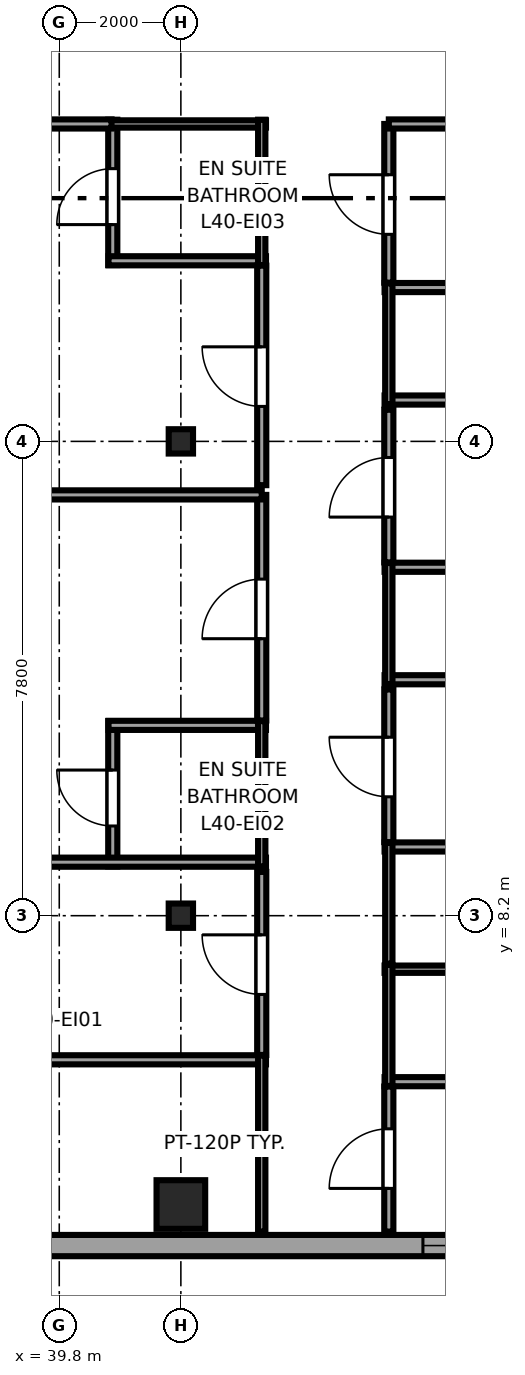
"""IFC4 building model, lengths in metres.
Left out: names, types, materials, properties, quantities, classifications, styles, units other than length and angle.
Written with IfcOpenShell. Run it as: python <this file> out.ifc"""

import sys

from ifc_helpers import new_model, si_unit, direction, frame, frame_2d, origin, origin_2d, place, context, subcontext, project, spatial, rectangle, i_section, extrude, source, transform, mapped, element, fill, save


model = new_model("IFC4")
c1 = context("Model", 3, precision=1e-05, world=origin(), true_north=direction((0.0, 1.0)))
c2 = subcontext(c1, "Body", "Model", "MODEL_VIEW")
j1 = project(units=[si_unit("LENGTHUNIT", "METRE"), si_unit("PLANEANGLEUNIT", "RADIAN")], contexts=[c1])
p1 = place(None, origin())
s1 = spatial("IfcSite", under=j1, at=p1, CompositionType="ELEMENT")
p2 = place(p1, origin())
s2 = spatial("IfcBuilding", under=s1, at=p2, CompositionType="ELEMENT")
p3 = place(p2, frame((0.0, 0.0, 154.15)))
s3 = spatial("IfcBuildingStorey", under=s2, at=p3, CompositionType="ELEMENT", Elevation=154.15)
m1 = source(origin(), c2, "Body", "SweptSolid", [
    extrude(rectangle(XDim=0.8, YDim=0.8, at=origin_2d()), origin(), (0.0, 0.0, 1.0), 3.55),
])
p4 = place(p3, frame((41.8, 3.45, 0.0), z_axis=(0.0, 0.0, 1.0), x_axis=(1.0, 0.0, 0.0)))
e1 = element("IfcColumn", 1, at=p4, inside=s3, PredefinedType="COLUMN", context=c2, shape_type="MappedRepresentation", body=[
    mapped(m1, transform((0.0, 0.0, 0.0), x_axis=(1.0, 0.0, 0.0), y_axis=(0.0, 1.0, 0.0), z_axis=(0.0, 0.0, 1.0), scale=1.0)),
])
m2 = source(origin(), c2, "Body", "SweptSolid", [
    extrude(i_section(OverallWidth=0.4, OverallDepth=0.4, WebThickness=0.02, FlangeThickness=0.035, at=origin_2d()), origin(), (0.0, 0.0, 1.0), 3.55),
])
for number, where, z_axis, x_axis in (
    (2, (41.8, 8.2, 0.0), (0.0, 0.0, 1.0), (1.0, 0.0, 0.0)),
    (3, (41.8, 16.0, 0.0), (0.0, 0.0, 1.0), (1.0, 0.0, 0.0)),
):
    element("IfcColumn", number, at=place(p3, frame(where, z_axis=z_axis, x_axis=x_axis)), inside=s3, PredefinedType="COLUMN", context=c2, shape_type="MappedRepresentation", body=[
        mapped(m2, transform((0.0, 0.0, 0.0), x_axis=(1.0, 0.0, 0.0), y_axis=(0.0, 1.0, 0.0), z_axis=(0.0, 0.0, 1.0), scale=1.0)),
    ])
p5 = place(p3, frame((34.375, 2.775, 0.0), z_axis=(0.0, 0.0, 1.0), x_axis=(1.0, 0.0, 0.0)))
e4 = element("IfcWall", 4, at=p5, inside=s3, PredefinedType="SOLIDWALL", context=c2, shape_type="SweptSolid", body=[
    extrude(rectangle(XDim=15.608, YDim=0.35, at=frame_2d((7.804, 0.0))), origin(), (0.0, 0.0, 1.0), 3.37),
])
p6 = place(p5, frame((1.801, 0.0, 0.68)))
e5 = element("IfcOpeningElement", 5, at=p6, cuts=e4, PredefinedType="OPENING", context=c2, shape_type="SweptSolid", body=[
    extrude(rectangle(XDim=2.4, YDim=1.9, at=frame_2d((1.2, 0.95))), frame((0.0, 0.185, 0.0), z_axis=(0.0, -1.0, 0.0), x_axis=(1.0, 0.0, 0.0)), (0.0, 0.0, 1.0), 0.37),
])
p7 = place(p5, frame((11.406, 0.0, 0.68)))
e6 = element("IfcOpeningElement", 6, at=p7, cuts=e4, PredefinedType="OPENING", context=c2, shape_type="SweptSolid", body=[
    extrude(rectangle(XDim=2.4, YDim=1.9, at=frame_2d((1.2, 0.95))), frame((0.0, 0.185, 0.0), z_axis=(0.0, -1.0, 0.0), x_axis=(1.0, 0.0, 0.0)), (0.0, 0.0, 1.0), 0.37),
])
p8 = place(p3, frame((39.46, 5.83, 0.0), z_axis=(0.0, 0.0, 1.0), x_axis=(1.0, 0.0, 0.0)))
e7 = element("IfcWall", 7, at=p8, inside=s3, PredefinedType="PARTITIONING", context=c2, shape_type="SweptSolid", body=[
    extrude(rectangle(XDim=3.74, YDim=0.15, at=frame_2d((1.87, 0.0))), origin(), (0.0, 0.0, 1.0), 3.37),
])
p9 = place(p3, frame((43.13, 3.005, 0.0), z_axis=(0.0, 0.0, 1.0), x_axis=(0.0, 1.0, 0.0)))
e8 = element("IfcWall", 8, at=p9, inside=s3, PredefinedType="PLUMBINGWALL", context=c2, shape_type="SweptSolid", body=[
    extrude(rectangle(XDim=2.895, YDim=0.12, at=frame_2d((1.448, 0.0))), origin(), (0.0, 0.0, 1.0), 3.37),
])
p10 = place(p3, frame((40.68, 9.01, 0.0), z_axis=(0.0, 0.0, 1.0), x_axis=(0.0, 1.0, 0.0)))
e9 = element("IfcWall", 9, at=p10, inside=s3, PredefinedType="PARTITIONING", context=c2, shape_type="SweptSolid", body=[
    extrude(rectangle(XDim=2.39, YDim=0.15, at=frame_2d((1.195, 0.0))), origin(), (0.0, 0.0, 1.0), 3.37),
])
p11 = place(p10, frame((0.665, 0.0, 0.0)))
e10 = element("IfcOpeningElement", 10, at=p11, cuts=e9, PredefinedType="OPENING", context=c2, shape_type="SweptSolid", body=[
    extrude(rectangle(XDim=0.92, YDim=2.01, at=frame_2d((0.46, 1.005))), frame((0.0, 0.085, 0.0), z_axis=(0.0, -1.0, 0.0), x_axis=(1.0, 0.0, 0.0)), (0.0, 0.0, 1.0), 0.17),
])
p12 = place(p3, frame((34.65, 9.08, 0.0), z_axis=(0.0, 0.0, 1.0), x_axis=(1.0, 0.0, 0.0)))
e11 = element("IfcWall", 11, at=p12, inside=s3, PredefinedType="PARTITIONING", context=c2, shape_type="SweptSolid", body=[
    extrude(rectangle(XDim=8.55, YDim=0.15, at=frame_2d((4.275, 0.0))), origin(), (0.0, 0.0, 1.0), 3.37),
])
p13 = place(p3, frame((40.61, 11.33, 0.0), z_axis=(0.0, 0.0, 1.0), x_axis=(1.0, 0.0, 0.0)))
e12 = element("IfcWall", 12, at=p13, inside=s3, PredefinedType="PARTITIONING", context=c2, shape_type="SweptSolid", body=[
    extrude(rectangle(XDim=2.59, YDim=0.15, at=frame_2d((1.295, 0.0))), origin(), (0.0, 0.0, 1.0), 3.37),
])
p14 = place(p3, frame((43.13, 9.01, 0.0), z_axis=(0.0, 0.0, 1.0), x_axis=(0.0, 1.0, 0.0)))
e13 = element("IfcWall", 13, at=p14, inside=s3, PredefinedType="PLUMBINGWALL", context=c2, shape_type="SweptSolid", body=[
    extrude(rectangle(XDim=2.39, YDim=0.12, at=frame_2d((1.195, 0.0))), origin(), (0.0, 0.0, 1.0), 3.37),
])
p15 = place(p3, frame((40.68, 18.9, 0.0), z_axis=(0.0, 0.0, 1.0), x_axis=(0.0, 1.0, 0.0)))
e14 = element("IfcWall", 14, at=p15, inside=s3, PredefinedType="PARTITIONING", context=c2, shape_type="SweptSolid", body=[
    extrude(rectangle(XDim=2.39, YDim=0.15, at=frame_2d((1.195, 0.0))), origin(), (0.0, 0.0, 1.0), 3.37),
])
p16 = place(p15, frame((0.665, 0.0, 0.0)))
e15 = element("IfcOpeningElement", 15, at=p16, cuts=e14, PredefinedType="OPENING", context=c2, shape_type="SweptSolid", body=[
    extrude(rectangle(XDim=0.92, YDim=2.01, at=frame_2d((0.46, 1.005))), frame((0.0, 0.085, 0.0), z_axis=(0.0, -1.0, 0.0), x_axis=(1.0, 0.0, 0.0)), (0.0, 0.0, 1.0), 0.17),
])
p17 = place(p3, frame((40.61, 18.97, 0.0), z_axis=(0.0, 0.0, 1.0), x_axis=(1.0, 0.0, 0.0)))
e16 = element("IfcWall", 16, at=p17, inside=s3, PredefinedType="PARTITIONING", context=c2, shape_type="SweptSolid", body=[
    extrude(rectangle(XDim=2.59, YDim=0.15, at=frame_2d((1.295, 0.0))), origin(), (0.0, 0.0, 1.0), 3.37),
])
p18 = place(p3, frame((40.61, 21.22, 0.0), z_axis=(0.0, 0.0, 1.0), x_axis=(1.0, 0.0, 0.0)))
e17 = element("IfcWall", 17, at=p18, inside=s3, PredefinedType="PLUMBINGWALL", context=c2, shape_type="SweptSolid", body=[
    extrude(rectangle(XDim=2.59, YDim=0.12, at=frame_2d((1.295, 0.0))), origin(), (0.0, 0.0, 1.0), 3.37),
])
p19 = place(p3, frame((43.13, 18.9, 0.0), z_axis=(0.0, 0.0, 1.0), x_axis=(0.0, 1.0, 0.0)))
e18 = element("IfcWall", 18, at=p19, inside=s3, PredefinedType="PLUMBINGWALL", context=c2, shape_type="SweptSolid", body=[
    extrude(rectangle(XDim=2.39, YDim=0.12, at=frame_2d((1.195, 0.0))), origin(), (0.0, 0.0, 1.0), 3.37),
])
p20 = place(p3, frame((45.15, 5.47, 0.0), z_axis=(0.0, 0.0, 1.0), x_axis=(1.0, 0.0, 0.0)))
e19 = element("IfcWall", 19, at=p20, inside=s3, PredefinedType="PARTITIONING", context=c2, shape_type="SweptSolid", body=[
    extrude(rectangle(XDim=2.59, YDim=0.15, at=frame_2d((1.295, 0.0))), origin(), (0.0, 0.0, 1.0), 3.37),
])
p21 = place(p3, frame((45.15, 7.32, 0.0), z_axis=(0.0, 0.0, 1.0), x_axis=(1.0, 0.0, 0.0)))
e20 = element("IfcWall", 20, at=p21, inside=s3, PredefinedType="PLUMBINGWALL", context=c2, shape_type="SweptSolid", body=[
    extrude(rectangle(XDim=2.59, YDim=0.12, at=frame_2d((1.295, 0.0))), origin(), (0.0, 0.0, 1.0), 3.37),
])
p22 = place(p3, frame((45.22, 5.4, 0.0), z_axis=(0.0, 0.0, 1.0), x_axis=(0.0, 1.0, 0.0)))
e21 = element("IfcWall", 21, at=p22, inside=s3, PredefinedType="PLUMBINGWALL", context=c2, shape_type="SweptSolid", body=[
    extrude(rectangle(XDim=1.99, YDim=0.12, at=frame_2d((0.995, 0.0))), origin(), (0.0, 0.0, 1.0), 3.37),
])
p23 = place(p3, frame((45.15, 9.33, 0.0), z_axis=(0.0, 0.0, 1.0), x_axis=(1.0, 0.0, 0.0)))
e22 = element("IfcWall", 22, at=p23, inside=s3, PredefinedType="PARTITIONING", context=c2, shape_type="SweptSolid", body=[
    extrude(rectangle(XDim=2.59, YDim=0.15, at=frame_2d((1.295, 0.0))), origin(), (0.0, 0.0, 1.0), 3.37),
])
p24 = place(p3, frame((45.22, 7.41, 0.0), z_axis=(0.0, 0.0, 1.0), x_axis=(0.0, 1.0, 0.0)))
e23 = element("IfcWall", 23, at=p24, inside=s3, PredefinedType="PLUMBINGWALL", context=c2, shape_type="SweptSolid", body=[
    extrude(rectangle(XDim=1.99, YDim=0.12, at=frame_2d((0.995, 0.0))), origin(), (0.0, 0.0, 1.0), 3.37),
])
p25 = place(p3, frame((45.15, 12.08, 0.0), z_axis=(0.0, 0.0, 1.0), x_axis=(1.0, 0.0, 0.0)))
e24 = element("IfcWall", 24, at=p25, inside=s3, PredefinedType="PARTITIONING", context=c2, shape_type="SweptSolid", body=[
    extrude(rectangle(XDim=8.845, YDim=0.15, at=frame_2d((4.423, 0.0))), origin(), (0.0, 0.0, 1.0), 3.37),
])
p26 = place(p3, frame((45.15, 13.93, 0.0), z_axis=(0.0, 0.0, 1.0), x_axis=(1.0, 0.0, 0.0)))
e25 = element("IfcWall", 25, at=p26, inside=s3, PredefinedType="PARTITIONING", context=c2, shape_type="SweptSolid", body=[
    extrude(rectangle(XDim=2.59, YDim=0.15, at=frame_2d((1.295, 0.0))), origin(), (0.0, 0.0, 1.0), 3.37),
])
p27 = place(p3, frame((45.22, 12.01, 0.0), z_axis=(0.0, 0.0, 1.0), x_axis=(0.0, 1.0, 0.0)))
e26 = element("IfcWall", 26, at=p27, inside=s3, PredefinedType="PLUMBINGWALL", context=c2, shape_type="SweptSolid", body=[
    extrude(rectangle(XDim=1.99, YDim=0.12, at=frame_2d((0.995, 0.0))), origin(), (0.0, 0.0, 1.0), 3.37),
])
p28 = place(p3, frame((45.15, 16.68, 0.0), z_axis=(0.0, 0.0, 1.0), x_axis=(1.0, 0.0, 0.0)))
e27 = element("IfcWall", 27, at=p28, inside=s3, PredefinedType="PARTITIONING", context=c2, shape_type="SweptSolid", body=[
    extrude(rectangle(XDim=8.845, YDim=0.15, at=frame_2d((4.423, 0.0))), origin(), (0.0, 0.0, 1.0), 3.37),
])
p29 = place(p3, frame((45.15, 18.53, 0.0), z_axis=(0.0, 0.0, 1.0), x_axis=(1.0, 0.0, 0.0)))
e28 = element("IfcWall", 28, at=p29, inside=s3, PredefinedType="PARTITIONING", context=c2, shape_type="SweptSolid", body=[
    extrude(rectangle(XDim=2.59, YDim=0.15, at=frame_2d((1.295, 0.0))), origin(), (0.0, 0.0, 1.0), 3.37),
])
p30 = place(p3, frame((45.22, 16.61, 0.0), z_axis=(0.0, 0.0, 1.0), x_axis=(0.0, 1.0, 0.0)))
e29 = element("IfcWall", 29, at=p30, inside=s3, PredefinedType="PLUMBINGWALL", context=c2, shape_type="SweptSolid", body=[
    extrude(rectangle(XDim=1.99, YDim=0.12, at=frame_2d((0.995, 0.0))), origin(), (0.0, 0.0, 1.0), 3.37),
])
p31 = place(p3, frame((43.13, 5.91, 0.0), z_axis=(0.0, 0.0, 1.0), x_axis=(0.0, 1.0, 0.0)))
e30 = element("IfcWall", 30, at=p31, inside=s3, PredefinedType="PARTITIONING", context=c2, shape_type="SweptSolid", body=[
    extrude(rectangle(XDim=3.01, YDim=0.15, at=frame_2d((1.505, 0.0))), origin(), (0.0, 0.0, 1.0), 3.37),
])
p32 = place(p31, frame((0.995, 0.0, 0.0)))
e31 = element("IfcOpeningElement", 31, at=p32, cuts=e30, PredefinedType="OPENING", context=c2, shape_type="SweptSolid", body=[
    extrude(rectangle(XDim=0.98, YDim=2.12, at=frame_2d((0.49, 1.06))), frame((0.0, 0.085, 0.0), z_axis=(0.0, -1.0, 0.0), x_axis=(1.0, 0.0, 0.0)), (0.0, 0.0, 1.0), 0.17),
])
p33 = place(p3, frame((43.13, 11.41, 0.0), z_axis=(0.0, 0.0, 1.0), x_axis=(0.0, 1.0, 0.0)))
e32 = element("IfcWall", 32, at=p33, inside=s3, PredefinedType="PARTITIONING", context=c2, shape_type="SweptSolid", body=[
    extrude(rectangle(XDim=3.71, YDim=0.15, at=frame_2d((1.855, 0.0))), origin(), (0.0, 0.0, 1.0), 3.37),
])
p34 = place(p33, frame((1.345, 0.0, 0.0)))
e33 = element("IfcOpeningElement", 33, at=p34, cuts=e32, PredefinedType="OPENING", context=c2, shape_type="SweptSolid", body=[
    extrude(rectangle(XDim=0.98, YDim=2.12, at=frame_2d((0.49, 1.06))), frame((0.0, 0.085, 0.0), z_axis=(0.0, -1.0, 0.0), x_axis=(1.0, 0.0, 0.0)), (0.0, 0.0, 1.0), 0.17),
])
p35 = place(p3, frame((34.65, 15.12, 0.0), z_axis=(0.0, 0.0, 1.0), x_axis=(1.0, 0.0, 0.0)))
e34 = element("IfcWall", 34, at=p35, inside=s3, PredefinedType="PARTITIONING", context=c2, shape_type="SweptSolid", body=[
    extrude(rectangle(XDim=8.48, YDim=0.15, at=frame_2d((4.24, 0.0))), origin(), (0.0, 0.0, 1.0), 3.37),
])
p36 = place(p3, frame((43.13, 15.28, 0.0), z_axis=(0.0, 0.0, 1.0), x_axis=(0.0, 1.0, 0.0)))
e35 = element("IfcWall", 35, at=p36, inside=s3, PredefinedType="PARTITIONING", context=c2, shape_type="SweptSolid", body=[
    extrude(rectangle(XDim=3.61, YDim=0.15, at=frame_2d((1.805, 0.0))), origin(), (0.0, 0.0, 1.0), 3.37),
])
p37 = place(p36, frame((1.295, 0.0, 0.0)))
e36 = element("IfcOpeningElement", 36, at=p37, cuts=e35, PredefinedType="OPENING", context=c2, shape_type="SweptSolid", body=[
    extrude(rectangle(XDim=0.98, YDim=2.12, at=frame_2d((0.49, 1.06))), frame((0.0, 0.085, 0.0), z_axis=(0.0, -1.0, 0.0), x_axis=(1.0, 0.0, 0.0)), (0.0, 0.0, 1.0), 0.17),
])
p38 = place(p3, frame((34.65, 21.22, 0.0), z_axis=(0.0, 0.0, 1.0), x_axis=(1.0, 0.0, 0.0)))
e37 = element("IfcWall", 37, at=p38, inside=s3, PredefinedType="PARTITIONING", context=c2, shape_type="SweptSolid", body=[
    extrude(rectangle(XDim=6.01, YDim=0.15, at=frame_2d((3.005, 0.0))), origin(), (0.0, 0.0, 1.0), 3.37),
])
p39 = place(p3, frame((45.22, 3.005, 0.0), z_axis=(0.0, 0.0, 1.0), x_axis=(0.0, 1.0, 0.0)))
e38 = element("IfcWall", 38, at=p39, inside=s3, PredefinedType="PARTITIONING", context=c2, shape_type="SweptSolid", body=[
    extrude(rectangle(XDim=2.385, YDim=0.15, at=frame_2d((1.192, 0.0))), origin(), (0.0, 0.0, 1.0), 3.37),
])
p40 = place(p39, frame((0.71, 0.0, 0.0)))
e39 = element("IfcOpeningElement", 39, at=p40, cuts=e38, PredefinedType="OPENING", context=c2, shape_type="SweptSolid", body=[
    extrude(rectangle(XDim=0.98, YDim=2.12, at=frame_2d((0.49, 1.06))), frame((0.0, 0.085, 0.0), z_axis=(0.0, -1.0, 0.0), x_axis=(1.0, 0.0, 0.0)), (0.0, 0.0, 1.0), 0.17),
])
p41 = place(p3, frame((45.22, 9.41, 0.0), z_axis=(0.0, 0.0, 1.0), x_axis=(0.0, 1.0, 0.0)))
e40 = element("IfcWall", 40, at=p41, inside=s3, PredefinedType="PARTITIONING", context=c2, shape_type="SweptSolid", body=[
    extrude(rectangle(XDim=2.51, YDim=0.15, at=frame_2d((1.255, 0.0))), origin(), (0.0, 0.0, 1.0), 3.37),
])
p42 = place(p41, frame((0.745, 0.0, 0.0)))
e41 = element("IfcOpeningElement", 41, at=p42, cuts=e40, PredefinedType="OPENING", context=c2, shape_type="SweptSolid", body=[
    extrude(rectangle(XDim=0.98, YDim=2.12, at=frame_2d((0.49, 1.06))), frame((0.0, 0.085, 0.0), z_axis=(0.0, -1.0, 0.0), x_axis=(1.0, 0.0, 0.0)), (0.0, 0.0, 1.0), 0.17),
])
p43 = place(p3, frame((45.22, 14.01, 0.0), z_axis=(0.0, 0.0, 1.0), x_axis=(0.0, 1.0, 0.0)))
e42 = element("IfcWall", 42, at=p43, inside=s3, PredefinedType="PARTITIONING", context=c2, shape_type="SweptSolid", body=[
    extrude(rectangle(XDim=2.51, YDim=0.15, at=frame_2d((1.255, 0.0))), origin(), (0.0, 0.0, 1.0), 3.37),
])
p44 = place(p43, frame((0.745, 0.0, 0.0)))
e43 = element("IfcOpeningElement", 43, at=p44, cuts=e42, PredefinedType="OPENING", context=c2, shape_type="SweptSolid", body=[
    extrude(rectangle(XDim=0.98, YDim=2.12, at=frame_2d((0.49, 1.06))), frame((0.0, 0.085, 0.0), z_axis=(0.0, -1.0, 0.0), x_axis=(1.0, 0.0, 0.0)), (0.0, 0.0, 1.0), 0.17),
])
p45 = place(p3, frame((45.22, 18.61, 0.0), z_axis=(0.0, 0.0, 1.0), x_axis=(0.0, 1.0, 0.0)))
e44 = element("IfcWall", 44, at=p45, inside=s3, PredefinedType="PARTITIONING", context=c2, shape_type="SweptSolid", body=[
    extrude(rectangle(XDim=2.61, YDim=0.15, at=frame_2d((1.305, 0.0))), origin(), (0.0, 0.0, 1.0), 3.37),
])
p46 = place(p45, frame((0.795, 0.0, 0.0)))
e45 = element("IfcOpeningElement", 45, at=p46, cuts=e44, PredefinedType="OPENING", context=c2, shape_type="SweptSolid", body=[
    extrude(rectangle(XDim=0.98, YDim=2.12, at=frame_2d((0.49, 1.06))), frame((0.0, 0.085, 0.0), z_axis=(0.0, -1.0, 0.0), x_axis=(1.0, 0.0, 0.0)), (0.0, 0.0, 1.0), 0.17),
])
p47 = place(p3, frame((45.22, 21.22, 0.0), z_axis=(0.0, 0.0, 1.0), x_axis=(1.0, 0.0, 0.0)))
e46 = element("IfcWall", 46, at=p47, inside=s3, PredefinedType="PARTITIONING", context=c2, shape_type="SweptSolid", body=[
    extrude(rectangle(XDim=8.775, YDim=0.15, at=frame_2d((4.388, 0.0))), origin(), (0.0, 0.0, 1.0), 3.37),
])
m3 = source(origin(), c2, "Body", "SweptSolid", [
    extrude(rectangle(XDim=2.4, YDim=1.9, at=frame_2d((1.2, 0.95))), frame((0.0, 0.09, 0.0), z_axis=(0.0, -1.0, 0.0), x_axis=(1.0, 0.0, 0.0)), (0.0, 0.0, 1.0), 0.06),
])
p48 = place(p7, origin())
e47 = element("IfcWindow", 47, at=p48, inside=s3, PartitioningType="TRIPLE_PANEL_HORIZONTAL", PredefinedType="WINDOW", context=c2, shape_type="MappedRepresentation", body=[
    mapped(m3, transform((0.0, 0.0, 0.0), x_axis=(1.0, 0.0, 0.0), y_axis=(0.0, 1.0, 0.0), z_axis=(0.0, 0.0, 1.0), scale=1.0)),
])
fill(e6, e47)
m4 = source(origin(), c2, "Body", "SweptSolid", [
    extrude(rectangle(XDim=0.92, YDim=2.01, at=frame_2d((0.46, 1.005))), frame((0.0, 0.025, 0.0), z_axis=(0.0, -1.0, 0.0), x_axis=(1.0, 0.0, 0.0)), (0.0, 0.0, 1.0), 0.05),
])
p49 = place(p11, origin())
e48 = element("IfcDoor", 48, at=p49, inside=s3, OperationType="SINGLE_SWING_RIGHT", PredefinedType="DOOR", context=c2, shape_type="MappedRepresentation", body=[
    mapped(m4, transform((0.0, 0.0, 0.0), x_axis=(1.0, 0.0, 0.0), y_axis=(0.0, 1.0, 0.0), z_axis=(0.0, 0.0, 1.0), scale=1.0)),
])
fill(e10, e48)
p50 = place(p16, origin())
e49 = element("IfcDoor", 49, at=p50, inside=s3, OperationType="SINGLE_SWING_LEFT", PredefinedType="DOOR", context=c2, shape_type="MappedRepresentation", body=[
    mapped(m4, transform((0.0, 0.0, 0.0), x_axis=(1.0, 0.0, 0.0), y_axis=(0.0, 1.0, 0.0), z_axis=(0.0, 0.0, 1.0), scale=1.0)),
])
fill(e15, e49)
m5 = source(origin(), c2, "Body", "SweptSolid", [
    extrude(rectangle(XDim=0.98, YDim=2.12, at=frame_2d((0.49, 1.06))), frame((0.0, 0.025, 0.0), z_axis=(0.0, -1.0, 0.0), x_axis=(1.0, 0.0, 0.0)), (0.0, 0.0, 1.0), 0.05),
])
p51 = place(p32, origin())
e50 = element("IfcDoor", 50, at=p51, inside=s3, OperationType="SINGLE_SWING_RIGHT", PredefinedType="DOOR", context=c2, shape_type="MappedRepresentation", body=[
    mapped(m5, transform((0.0, 0.0, 0.0), x_axis=(1.0, 0.0, 0.0), y_axis=(0.0, 1.0, 0.0), z_axis=(0.0, 0.0, 1.0), scale=1.0)),
])
fill(e31, e50)
p52 = place(p34, origin())
e51 = element("IfcDoor", 51, at=p52, inside=s3, OperationType="SINGLE_SWING_LEFT", PredefinedType="DOOR", context=c2, shape_type="MappedRepresentation", body=[
    mapped(m5, transform((0.0, 0.0, 0.0), x_axis=(1.0, 0.0, 0.0), y_axis=(0.0, 1.0, 0.0), z_axis=(0.0, 0.0, 1.0), scale=1.0)),
])
fill(e33, e51)
p53 = place(p37, origin())
e52 = element("IfcDoor", 52, at=p53, inside=s3, OperationType="SINGLE_SWING_RIGHT", PredefinedType="DOOR", context=c2, shape_type="MappedRepresentation", body=[
    mapped(m5, transform((0.0, 0.0, 0.0), x_axis=(1.0, 0.0, 0.0), y_axis=(0.0, 1.0, 0.0), z_axis=(0.0, 0.0, 1.0), scale=1.0)),
])
fill(e36, e52)
p54 = place(p40, origin())
e53 = element("IfcDoor", 53, at=p54, inside=s3, OperationType="SINGLE_SWING_LEFT", PredefinedType="DOOR", context=c2, shape_type="MappedRepresentation", body=[
    mapped(m5, transform((0.0, 0.0, 0.0), x_axis=(1.0, 0.0, 0.0), y_axis=(0.0, 1.0, 0.0), z_axis=(0.0, 0.0, 1.0), scale=1.0)),
])
fill(e39, e53)
p55 = place(p42, origin())
e54 = element("IfcDoor", 54, at=p55, inside=s3, OperationType="SINGLE_SWING_RIGHT", PredefinedType="DOOR", context=c2, shape_type="MappedRepresentation", body=[
    mapped(m5, transform((0.0, 0.0, 0.0), x_axis=(1.0, 0.0, 0.0), y_axis=(0.0, 1.0, 0.0), z_axis=(0.0, 0.0, 1.0), scale=1.0)),
])
fill(e41, e54)
p56 = place(p44, origin())
e55 = element("IfcDoor", 55, at=p56, inside=s3, OperationType="SINGLE_SWING_LEFT", PredefinedType="DOOR", context=c2, shape_type="MappedRepresentation", body=[
    mapped(m5, transform((0.0, 0.0, 0.0), x_axis=(1.0, 0.0, 0.0), y_axis=(0.0, 1.0, 0.0), z_axis=(0.0, 0.0, 1.0), scale=1.0)),
])
fill(e43, e55)
p57 = place(p46, origin())
e56 = element("IfcDoor", 56, at=p57, inside=s3, OperationType="SINGLE_SWING_RIGHT", PredefinedType="DOOR", context=c2, shape_type="MappedRepresentation", body=[
    mapped(m5, transform((0.0, 0.0, 0.0), x_axis=(1.0, 0.0, 0.0), y_axis=(0.0, 1.0, 0.0), z_axis=(0.0, 0.0, 1.0), scale=1.0)),
])
fill(e45, e56)
save(model, sys.argv[1])
